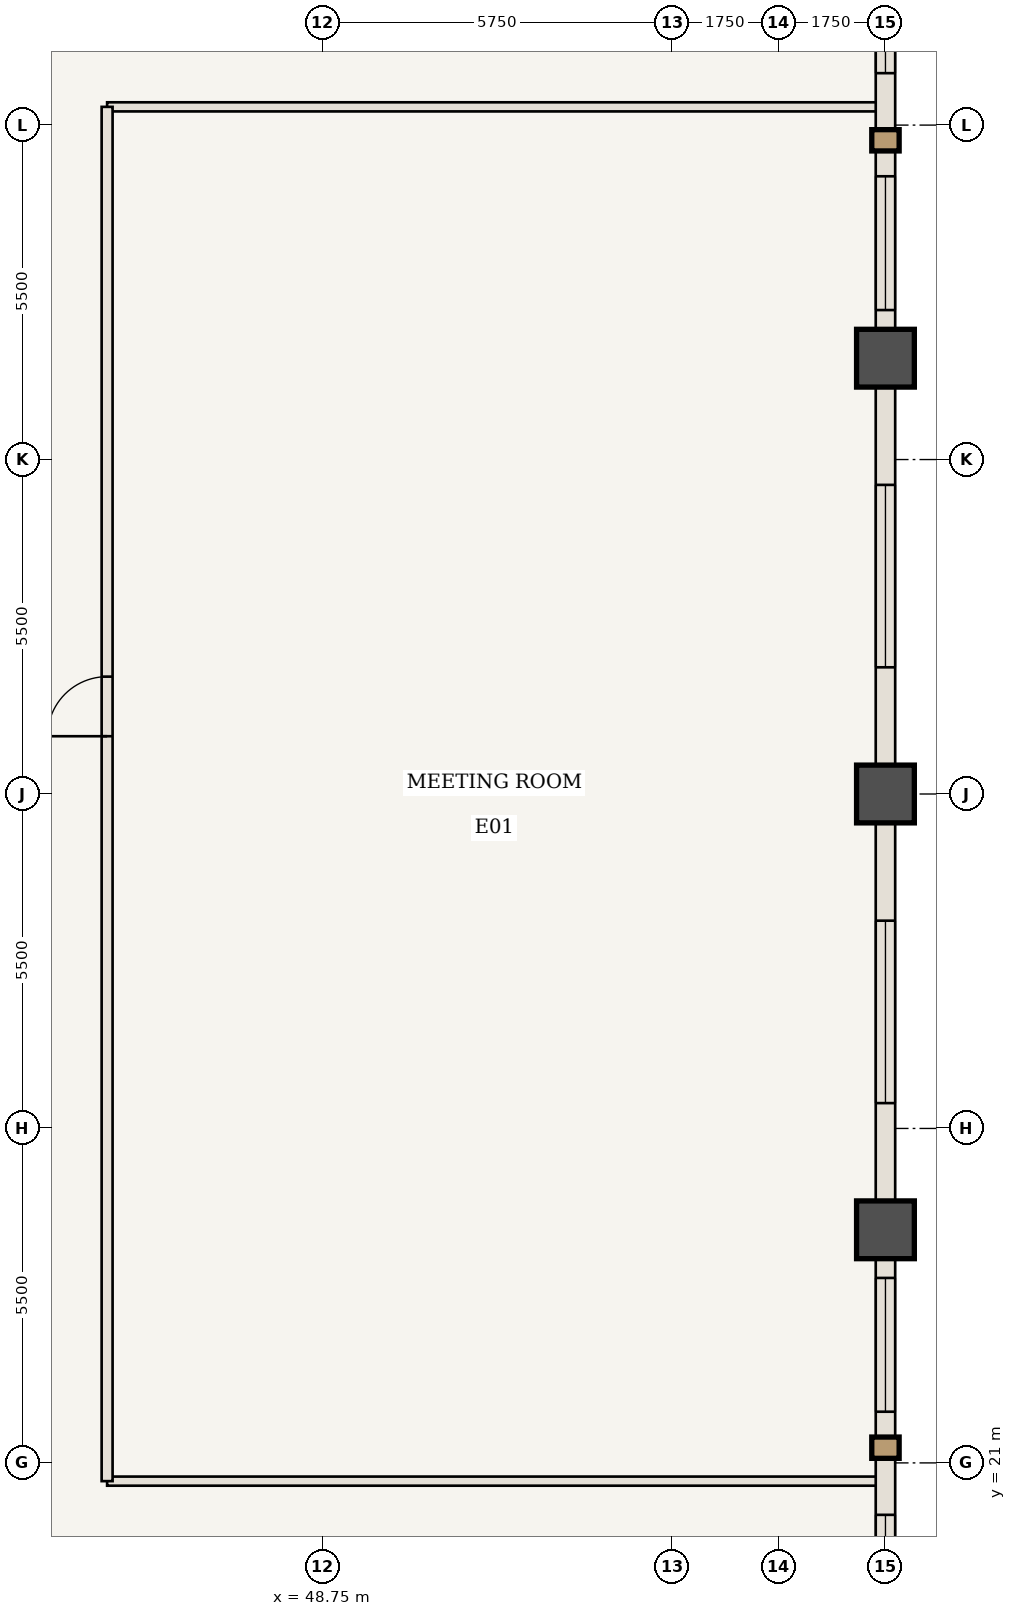
"""IFC4 building model, lengths in metres.
Left out: names, types, materials, properties, quantities, classifications, styles, units other than length and angle.
Written with IfcOpenShell. Run it as: python <this file> out.ifc"""

import sys

from ifc_helpers import new_model, si_unit, direction, frame, frame_2d, origin, origin_2d, place, context, subcontext, project, spatial, rectangle, extrude, element, fill, save


model = new_model("IFC4")
c1 = context("Model", 3, precision=1e-05, world=origin(), true_north=direction((0.0, 1.0)))
c2 = subcontext(c1, "Body", "Model", "MODEL_VIEW")
j1 = project(units=[si_unit("LENGTHUNIT", "METRE"), si_unit("PLANEANGLEUNIT", "RADIAN")], contexts=[c1])
p1 = place(None, origin())
s1 = spatial("IfcSite", under=j1, at=p1, CompositionType="ELEMENT")
p2 = place(p1, origin())
s2 = spatial("IfcBuilding", under=s1, at=p2, CompositionType="ELEMENT")
p3 = place(p2, frame((0.0, 0.0, 160.65)))
s3 = spatial("IfcBuildingStorey", under=s2, at=p3, CompositionType="ELEMENT", Elevation=160.65)
for number, where, z_axis, x_axis in (
    (1, (58.0, 24.833, 0.0), (0.0, 0.0, 1.0), (1.0, 0.0, 0.0)),
    (2, (58.0, 32.0, 0.0), (0.0, 0.0, 1.0), (1.0, 0.0, 0.0)),
    (3, (58.0, 39.167, 0.0), (0.0, 0.0, 1.0), (1.0, 0.0, 0.0)),
):
    element("IfcColumn", number, at=place(p3, frame(where, z_axis=z_axis, x_axis=x_axis)), inside=s3, PredefinedType="COLUMN", context=c2, shape_type="SweptSolid", body=[
        extrude(rectangle(XDim=0.95, YDim=0.95, at=origin_2d()), origin(), (0.0, 0.0, 1.0), 3.85),
    ])
for number, where, z_axis, x_axis in (
    (4, (45.2, 20.7, 0.0), (0.0, 0.0, 1.0), (1.0, 0.0, 0.0)),
    (5, (45.2, 43.3, 0.0), (0.0, 0.0, 1.0), (1.0, 0.0, 0.0)),
):
    element("IfcWall", number, at=place(p3, frame(where, z_axis=z_axis, x_axis=x_axis)), inside=s3, PredefinedType="STANDARD", context=c2, shape_type="SweptSolid", body=[
        extrude(rectangle(XDim=12.74, YDim=0.15, at=frame_2d((6.37, 0.0))), origin(), (0.0, 0.0, 1.0), 3.065),
    ])
p4 = place(p3, frame((45.2, 20.7, 0.0), z_axis=(0.0, 0.0, 1.0), x_axis=(0.0, 1.0, 0.0)))
e6 = element("IfcWall", 6, at=p4, inside=s3, PredefinedType="STANDARD", context=c2, shape_type="SweptSolid", body=[
    extrude(rectangle(XDim=22.6, YDim=0.18, at=frame_2d((11.3, 0.0))), origin(), (0.0, 0.0, 1.0), 3.685),
])
p5 = place(p4, frame((12.25, 0.0, 0.0)))
e7 = element("IfcOpeningElement", 7, at=p5, cuts=e6, PredefinedType="OPENING", context=c2, shape_type="SweptSolid", body=[
    extrude(rectangle(XDim=0.98, YDim=2.2, at=frame_2d((0.49, 1.1))), frame((0.0, 0.1, 0.0), z_axis=(0.0, -1.0, 0.0), x_axis=(1.0, 0.0, 0.0)), (0.0, 0.0, 1.0), 0.2),
])
p6 = place(p3, frame((58.0, 24.833, 0.0), z_axis=(0.0, 0.0, 1.0), x_axis=(0.0, -1.0, 0.0)))
e8 = element("IfcWall", 8, at=p6, inside=s3, PredefinedType="USERDEFINED", context=c2, shape_type="SweptSolid", body=[
    extrude(rectangle(XDim=7.167, YDim=0.32, at=frame_2d((3.583, 0.0))), origin(), (0.0, 0.0, 1.0), 2.885),
])
p7 = place(p6, frame((0.792, 0.0, 0.85)))
e9 = element("IfcOpeningElement", 9, at=p7, cuts=e8, PredefinedType="OPENING", context=c2, shape_type="SweptSolid", body=[
    extrude(rectangle(XDim=2.2, YDim=1.835, at=frame_2d((1.1, 0.917))), frame((0.0, 0.17, 0.0), z_axis=(0.0, -1.0, 0.0), x_axis=(1.0, 0.0, 0.0)), (0.0, 0.0, 1.0), 0.34),
])
p8 = place(p6, frame((4.688, 0.0, 0.85)))
e10 = element("IfcOpeningElement", 10, at=p8, cuts=e8, PredefinedType="OPENING", context=c2, shape_type="SweptSolid", body=[
    extrude(rectangle(XDim=1.6, YDim=1.835, at=frame_2d((0.8, 0.917))), frame((0.0, 0.17, 0.0), z_axis=(0.0, -1.0, 0.0), x_axis=(1.0, 0.0, 0.0)), (0.0, 0.0, 1.0), 0.34),
])
p9 = place(p3, frame((58.0, 32.0, 0.0), z_axis=(0.0, 0.0, 1.0), x_axis=(0.0, -1.0, 0.0)))
e11 = element("IfcWall", 11, at=p9, inside=s3, PredefinedType="USERDEFINED", context=c2, shape_type="SweptSolid", body=[
    extrude(rectangle(XDim=7.167, YDim=0.32, at=frame_2d((3.583, 0.0))), origin(), (0.0, 0.0, 1.0), 2.885),
])
p10 = place(p9, frame((2.083, 0.0, 0.85)))
e12 = element("IfcOpeningElement", 12, at=p10, cuts=e11, PredefinedType="OPENING", context=c2, shape_type="SweptSolid", body=[
    extrude(rectangle(XDim=3.0, YDim=1.835, at=frame_2d((1.5, 0.917))), frame((0.0, 0.17, 0.0), z_axis=(0.0, -1.0, 0.0), x_axis=(1.0, 0.0, 0.0)), (0.0, 0.0, 1.0), 0.34),
])
p11 = place(p3, frame((58.0, 39.167, 0.0), z_axis=(0.0, 0.0, 1.0), x_axis=(0.0, -1.0, 0.0)))
e13 = element("IfcWall", 13, at=p11, inside=s3, PredefinedType="USERDEFINED", context=c2, shape_type="SweptSolid", body=[
    extrude(rectangle(XDim=7.167, YDim=0.32, at=frame_2d((3.583, 0.0))), origin(), (0.0, 0.0, 1.0), 2.885),
])
p12 = place(p11, frame((2.083, 0.0, 0.85)))
e14 = element("IfcOpeningElement", 14, at=p12, cuts=e13, PredefinedType="OPENING", context=c2, shape_type="SweptSolid", body=[
    extrude(rectangle(XDim=3.0, YDim=1.835, at=frame_2d((1.5, 0.917))), frame((0.0, 0.17, 0.0), z_axis=(0.0, -1.0, 0.0), x_axis=(1.0, 0.0, 0.0)), (0.0, 0.0, 1.0), 0.34),
])
p13 = place(p3, frame((58.0, 46.333, 0.0), z_axis=(0.0, 0.0, 1.0), x_axis=(0.0, -1.0, 0.0)))
e15 = element("IfcWall", 15, at=p13, inside=s3, PredefinedType="USERDEFINED", context=c2, shape_type="SweptSolid", body=[
    extrude(rectangle(XDim=7.167, YDim=0.32, at=frame_2d((3.583, 0.0))), origin(), (0.0, 0.0, 1.0), 2.885),
])
p14 = place(p13, frame((0.879, 0.0, 0.85)))
e16 = element("IfcOpeningElement", 16, at=p14, cuts=e15, PredefinedType="OPENING", context=c2, shape_type="SweptSolid", body=[
    extrude(rectangle(XDim=1.6, YDim=1.835, at=frame_2d((0.8, 0.917))), frame((0.0, 0.17, 0.0), z_axis=(0.0, -1.0, 0.0), x_axis=(1.0, 0.0, 0.0)), (0.0, 0.0, 1.0), 0.34),
])
p15 = place(p13, frame((4.175, 0.0, 0.85)))
e17 = element("IfcOpeningElement", 17, at=p15, cuts=e15, PredefinedType="OPENING", context=c2, shape_type="SweptSolid", body=[
    extrude(rectangle(XDim=2.2, YDim=1.835, at=frame_2d((1.1, 0.917))), frame((0.0, 0.17, 0.0), z_axis=(0.0, -1.0, 0.0), x_axis=(1.0, 0.0, 0.0)), (0.0, 0.0, 1.0), 0.34),
])
p16 = place(p5, origin())
e18 = element("IfcDoor", 18, at=p16, inside=s3, OperationType="SINGLE_SWING_LEFT", PredefinedType="DOOR", context=c2, shape_type="SweptSolid", body=[
    extrude(rectangle(XDim=0.98, YDim=2.2, at=frame_2d((0.49, 1.1))), frame((0.0, 0.025, 0.0), z_axis=(0.0, -1.0, 0.0), x_axis=(1.0, 0.0, 0.0)), (0.0, 0.0, 1.0), 0.05),
])
fill(e7, e18)
p17 = place(p7, origin())
e19 = element("IfcWindow", 19, at=p17, inside=s3, PartitioningType="SINGLE_PANEL", PredefinedType="WINDOW", context=c2, shape_type="SweptSolid", body=[
    extrude(rectangle(XDim=2.2, YDim=1.835, at=frame_2d((1.1, 0.917))), frame((0.0, 0.03, 0.0), z_axis=(0.0, -1.0, 0.0), x_axis=(1.0, 0.0, 0.0)), (0.0, 0.0, 1.0), 0.06),
])
fill(e9, e19)
p18 = place(p8, origin())
e20 = element("IfcWindow", 20, at=p18, inside=s3, PartitioningType="SINGLE_PANEL", PredefinedType="WINDOW", context=c2, shape_type="SweptSolid", body=[
    extrude(rectangle(XDim=1.6, YDim=1.835, at=frame_2d((0.8, 0.917))), frame((0.0, 0.03, 0.0), z_axis=(0.0, -1.0, 0.0), x_axis=(1.0, 0.0, 0.0)), (0.0, 0.0, 1.0), 0.06),
])
fill(e10, e20)
p19 = place(p10, origin())
e21 = element("IfcWindow", 21, at=p19, inside=s3, PartitioningType="SINGLE_PANEL", PredefinedType="WINDOW", context=c2, shape_type="SweptSolid", body=[
    extrude(rectangle(XDim=3.0, YDim=1.835, at=frame_2d((1.5, 0.917))), frame((0.0, 0.03, 0.0), z_axis=(0.0, -1.0, 0.0), x_axis=(1.0, 0.0, 0.0)), (0.0, 0.0, 1.0), 0.06),
])
fill(e12, e21)
p20 = place(p12, origin())
e22 = element("IfcWindow", 22, at=p20, inside=s3, PartitioningType="SINGLE_PANEL", PredefinedType="WINDOW", context=c2, shape_type="SweptSolid", body=[
    extrude(rectangle(XDim=3.0, YDim=1.835, at=frame_2d((1.5, 0.917))), frame((0.0, 0.03, 0.0), z_axis=(0.0, -1.0, 0.0), x_axis=(1.0, 0.0, 0.0)), (0.0, 0.0, 1.0), 0.06),
])
fill(e14, e22)
p21 = place(p14, origin())
e23 = element("IfcWindow", 23, at=p21, inside=s3, PartitioningType="SINGLE_PANEL", PredefinedType="WINDOW", context=c2, shape_type="SweptSolid", body=[
    extrude(rectangle(XDim=1.6, YDim=1.835, at=frame_2d((0.8, 0.917))), frame((0.0, 0.03, 0.0), z_axis=(0.0, -1.0, 0.0), x_axis=(1.0, 0.0, 0.0)), (0.0, 0.0, 1.0), 0.06),
])
fill(e16, e23)
p22 = place(p15, origin())
e24 = element("IfcWindow", 24, at=p22, inside=s3, PartitioningType="SINGLE_PANEL", PredefinedType="WINDOW", context=c2, shape_type="SweptSolid", body=[
    extrude(rectangle(XDim=2.2, YDim=1.835, at=frame_2d((1.1, 0.917))), frame((0.0, 0.03, 0.0), z_axis=(0.0, -1.0, 0.0), x_axis=(1.0, 0.0, 0.0)), (0.0, 0.0, 1.0), 0.06),
])
fill(e17, e24)
save(model, sys.argv[1])
